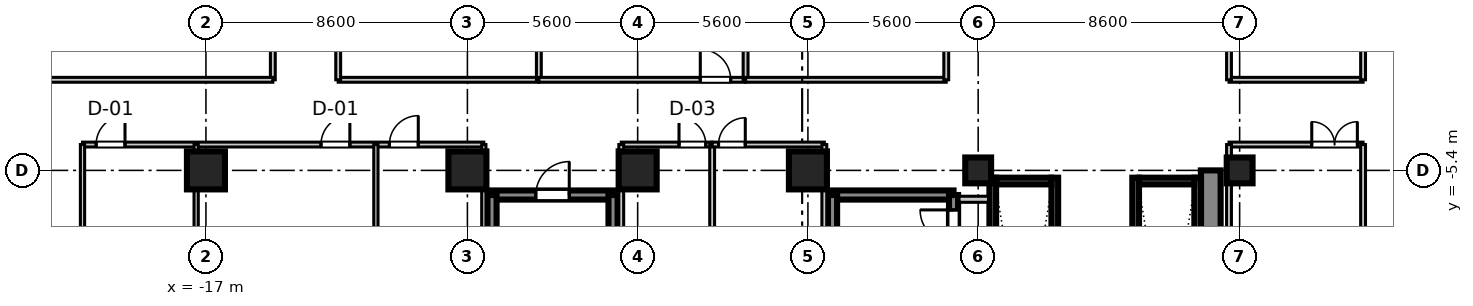
"""IFC4 building model, lengths in metres.
Left out: names, types, materials, properties, quantities, classifications, styles, units other than length and angle.
Written with IfcOpenShell. Run it as: python <this file> out.ifc"""

import sys

from ifc_helpers import new_model, si_unit, direction, frame, frame_2d, origin, origin_2d, place, context, subcontext, project, spatial, rectangle, extrude, source, transform, mapped, element, fill, save


model = new_model("IFC4")
c1 = context("Model", 3, precision=1e-05, world=origin(), true_north=direction((0.0, 1.0)))
c2 = subcontext(c1, "Body", "Model", "MODEL_VIEW")
j1 = project(units=[si_unit("LENGTHUNIT", "METRE"), si_unit("PLANEANGLEUNIT", "RADIAN")], contexts=[c1])
p1 = place(None, origin())
s1 = spatial("IfcSite", under=j1, at=p1, CompositionType="ELEMENT")
p2 = place(p1, origin())
s2 = spatial("IfcBuilding", under=s1, at=p2, CompositionType="ELEMENT")
p3 = place(p2, frame((0.0, 0.0, 88.3)))
s3 = spatial("IfcBuildingStorey", under=s2, at=p3, CompositionType="ELEMENT", Elevation=88.3)
m1 = source(origin(), c2, "Body", "SweptSolid", [
    extrude(rectangle(XDim=1.25, YDim=1.25, at=origin_2d()), origin(), (0.0, 0.0, 1.0), 3.605),
])
for number, where, z_axis, x_axis in (
    (1, (-17.0, -5.4, 0.0), (0.0, 0.0, 1.0), (1.0, 0.0, 0.0)),
    (2, (-8.4, -5.4, 0.0), (0.0, 0.0, 1.0), (1.0, 0.0, 0.0)),
    (3, (-2.8, -5.4, 0.0), (0.0, 0.0, 1.0), (1.0, 0.0, 0.0)),
    (4, (2.8, -5.4, 0.0), (0.0, 0.0, 1.0), (1.0, 0.0, 0.0)),
):
    element("IfcColumn", number, at=place(p3, frame(where, z_axis=z_axis, x_axis=x_axis)), inside=s3, PredefinedType="COLUMN", context=c2, shape_type="MappedRepresentation", body=[
        mapped(m1, transform((0.0, 0.0, 0.0), scale=1.0)),
    ])
m2 = source(origin(), c2, "Body", "SweptSolid", [
    extrude(rectangle(XDim=0.85, YDim=0.85, at=origin_2d()), origin(), (0.0, 0.0, 1.0), 3.605),
])
for number, where, z_axis, x_axis in (
    (5, (8.4, -5.4, 0.0), (0.0, 0.0, 1.0), (1.0, 0.0, 0.0)),
    (6, (17.0, -5.4, 0.0), (0.0, 0.0, 1.0), (1.0, 0.0, 0.0)),
):
    element("IfcColumn", number, at=place(p3, frame(where, z_axis=z_axis, x_axis=x_axis)), inside=s3, PredefinedType="PILASTER", context=c2, shape_type="MappedRepresentation", body=[
        mapped(m2, transform((0.0, 0.0, 0.0), scale=1.0)),
    ])
m3 = source(origin(), c2, "Body", "SweptSolid", [
    extrude(rectangle(XDim=11.6, YDim=0.65, at=frame_2d((5.8, 0.0))), origin(), (0.0, 0.0, 1.0), 3.38),
])
p4 = place(p3, frame((16.05, -17.0, 0.0), z_axis=(0.0, 0.0, 1.0), x_axis=(0.0, 1.0, 0.0)))
e7 = element("IfcWall", 7, at=p4, inside=s3, PredefinedType="SHEAR", context=c2, shape_type="MappedRepresentation", body=[
    mapped(m3, transform((0.0, 0.0, 0.0), scale=1.0)),
])
m4 = source(origin(), c2, "Body", "SweptSolid", [
    extrude(rectangle(XDim=3.98, YDim=0.3, at=frame_2d((1.99, 0.0))), origin(), (0.0, 0.0, 1.0), 3.38),
])
p5 = place(p3, frame((3.61, -6.21, 0.0), z_axis=(0.0, 0.0, 1.0), x_axis=(1.0, 0.0, 0.0)))
e8 = element("IfcWall", 8, at=p5, inside=s3, PredefinedType="SHEAR", context=c2, shape_type="MappedRepresentation", body=[
    mapped(m4, transform((0.0, 0.0, 0.0), scale=1.0)),
])
m5 = source(origin(), c2, "Body", "SweptSolid", [
    extrude(rectangle(XDim=9.38, YDim=0.3, at=frame_2d((4.69, 0.0))), origin(), (0.0, 0.0, 1.0), 3.38),
])
p6 = place(p3, frame((3.61, -15.59, 0.0), z_axis=(0.0, 0.0, 1.0), x_axis=(0.0, 1.0, 0.0)))
e9 = element("IfcWall", 9, at=p6, inside=s3, PredefinedType="SHEAR", context=c2, shape_type="MappedRepresentation", body=[
    mapped(m5, transform((0.0, 0.0, 0.0), scale=1.0)),
])
p7 = place(p3, frame((7.59, -15.59, 0.0), z_axis=(0.0, 0.0, 1.0), x_axis=(0.0, 1.0, 0.0)))
e10 = element("IfcWall", 10, at=p7, inside=s3, PredefinedType="SHEAR", context=c2, shape_type="MappedRepresentation", body=[
    mapped(m5, transform((0.0, 0.0, 0.0), scale=1.0)),
])
p8 = place(p7, frame((7.79, 0.0, 0.0)))
e11 = element("IfcOpeningElement", 11, at=p8, cuts=e10, PredefinedType="OPENING", context=c2, shape_type="SweptSolid", body=[
    extrude(rectangle(XDim=1.1, YDim=2.15, at=frame_2d((0.55, 1.075))), frame((0.0, 0.16, 0.0), z_axis=(0.0, -1.0, 0.0), x_axis=(1.0, 0.0, 0.0)), (0.0, 0.0, 1.0), 0.32),
])
p9 = place(p3, frame((-7.59, -6.21, 0.0), z_axis=(0.0, 0.0, 1.0), x_axis=(1.0, 0.0, 0.0)))
e12 = element("IfcWall", 12, at=p9, inside=s3, PredefinedType="SHEAR", context=c2, shape_type="MappedRepresentation", body=[
    mapped(m4, transform((0.0, 0.0, 0.0), scale=1.0)),
])
p10 = place(p9, frame((1.44, 0.0, 0.0)))
e13 = element("IfcOpeningElement", 13, at=p10, cuts=e12, PredefinedType="OPENING", context=c2, shape_type="SweptSolid", body=[
    extrude(rectangle(XDim=1.1, YDim=2.15, at=frame_2d((0.55, 1.075))), frame((0.0, 0.16, 0.0), z_axis=(0.0, -1.0, 0.0), x_axis=(1.0, 0.0, 0.0)), (0.0, 0.0, 1.0), 0.32),
])
for number, where, z_axis, x_axis in (
    (14, (-7.59, -15.59, 0.0), (0.0, 0.0, 1.0), (0.0, 1.0, 0.0)),
    (15, (-3.61, -15.59, 0.0), (0.0, 0.0, 1.0), (0.0, 1.0, 0.0)),
):
    element("IfcWall", number, at=place(p3, frame(where, z_axis=z_axis, x_axis=x_axis)), inside=s3, PredefinedType="SHEAR", context=c2, shape_type="MappedRepresentation", body=[
        mapped(m5, transform((0.0, 0.0, 0.0), scale=1.0)),
    ])
m6 = source(origin(), c2, "Body", "SweptSolid", [
    extrude(rectangle(XDim=2.36, YDim=0.22, at=frame_2d((1.18, 0.0))), origin(), (0.0, 0.0, 1.0), 3.38),
])
for number, where, z_axis, x_axis in (
    (16, (13.58, -8.0, 0.0), (0.0, 0.0, 1.0), (0.0, 1.0, 0.0)),
    (17, (15.62, -8.0, 0.0), (0.0, 0.0, 1.0), (0.0, 1.0, 0.0)),
):
    element("IfcWall", number, at=place(p3, frame(where, z_axis=z_axis, x_axis=x_axis)), inside=s3, PredefinedType="SHEAR", context=c2, shape_type="MappedRepresentation", body=[
        mapped(m6, transform((0.0, 0.0, 0.0), scale=1.0)),
    ])
m7 = source(origin(), c2, "Body", "SweptSolid", [
    extrude(rectangle(XDim=1.82, YDim=0.22, at=frame_2d((0.91, 0.0))), origin(), (0.0, 0.0, 1.0), 3.38),
])
p11 = place(p3, frame((13.69, -5.75, 0.0), z_axis=(0.0, 0.0, 1.0), x_axis=(1.0, 0.0, 0.0)))
e18 = element("IfcWall", 18, at=p11, inside=s3, PredefinedType="SHEAR", context=c2, shape_type="MappedRepresentation", body=[
    mapped(m7, transform((0.0, 0.0, 0.0), scale=1.0)),
])
for number, where, z_axis, x_axis in (
    (19, (8.88, -8.0, 0.0), (0.0, 0.0, 1.0), (0.0, 1.0, 0.0)),
    (20, (10.92, -8.0, 0.0), (0.0, 0.0, 1.0), (0.0, 1.0, 0.0)),
):
    element("IfcWall", number, at=place(p3, frame(where, z_axis=z_axis, x_axis=x_axis)), inside=s3, PredefinedType="SHEAR", context=c2, shape_type="MappedRepresentation", body=[
        mapped(m6, transform((0.0, 0.0, 0.0), scale=1.0)),
    ])
p12 = place(p3, frame((8.99, -5.75, 0.0), z_axis=(0.0, 0.0, 1.0), x_axis=(1.0, 0.0, 0.0)))
e21 = element("IfcWall", 21, at=p12, inside=s3, PredefinedType="SHEAR", context=c2, shape_type="MappedRepresentation", body=[
    mapped(m7, transform((0.0, 0.0, 0.0), scale=1.0)),
])
m8 = source(origin(), c2, "Body", "SweptSolid", [
    extrude(rectangle(XDim=0.97, YDim=0.2, at=frame_2d((0.485, 0.0))), origin(), (0.0, 0.0, 1.0), 2.72),
])
p13 = place(p3, frame((7.77, -6.35, 0.0), z_axis=(0.0, 0.0, 1.0), x_axis=(1.0, 0.0, 0.0)))
e22 = element("IfcWall", 22, at=p13, inside=s3, PredefinedType="PARTITIONING", context=c2, shape_type="MappedRepresentation", body=[
    mapped(m8, transform((0.0, 0.0, 0.0), scale=1.0)),
])
m9 = source(origin(), c2, "Body", "SweptSolid", [
    extrude(rectangle(XDim=4.41, YDim=0.16, at=frame_2d((2.205, 0.0))), origin(), (0.0, 0.0, 1.0), 2.72),
])
p14 = place(p3, frame((16.65, -4.55, 0.0), z_axis=(0.0, 0.0, 1.0), x_axis=(1.0, 0.0, 0.0)))
e23 = element("IfcWall", 23, at=p14, inside=s3, PredefinedType="PARTITIONING", context=c2, shape_type="MappedRepresentation", body=[
    mapped(m9, transform((0.0, 0.0, 0.0), scale=1.0)),
])
p15 = place(p14, frame((2.722, 0.0, 0.0)))
e24 = element("IfcOpeningElement", 24, at=p15, cuts=e23, PredefinedType="OPENING", context=c2, shape_type="SweptSolid", body=[
    extrude(rectangle(XDim=1.5, YDim=2.15, at=frame_2d((0.75, 1.075))), frame((0.0, 0.09, 0.0), z_axis=(0.0, -1.0, 0.0), x_axis=(1.0, 0.0, 0.0)), (0.0, 0.0, 1.0), 0.18),
])
m10 = source(origin(), c2, "Body", "SweptSolid", [
    extrude(rectangle(XDim=19.25, YDim=0.16, at=frame_2d((9.625, 0.0))), origin(), (0.0, 0.0, 1.0), 2.72),
])
p16 = place(p3, frame((16.65, -23.8, 0.0), z_axis=(0.0, 0.0, 1.0), x_axis=(0.0, 1.0, 0.0)))
e25 = element("IfcWall", 25, at=p16, inside=s3, PredefinedType="PARTITIONING", context=c2, shape_type="MappedRepresentation", body=[
    mapped(m10, transform((0.0, 0.0, 0.0), scale=1.0)),
])
m11 = source(origin(), c2, "Body", "SweptSolid", [
    extrude(rectangle(XDim=17.83, YDim=0.16, at=frame_2d((8.915, 0.0))), origin(), (0.0, 0.0, 1.0), 2.72),
])
p17 = place(p3, frame((21.06, -22.38, 0.0), z_axis=(0.0, 0.0, 1.0), x_axis=(0.0, 1.0, 0.0)))
e26 = element("IfcWall", 26, at=p17, inside=s3, PredefinedType="PARTITIONING", context=c2, shape_type="MappedRepresentation", body=[
    mapped(m11, transform((0.0, 0.0, 0.0), scale=1.0)),
])
m12 = source(origin(), c2, "Body", "SweptSolid", [
    extrude(rectangle(XDim=13.2, YDim=0.16, at=frame_2d((6.6, 0.0))), origin(), (0.0, 0.0, 1.0), 2.72),
])
p18 = place(p3, frame((-21.06, -4.55, 0.0), z_axis=(0.0, 0.0, 1.0), x_axis=(1.0, 0.0, 0.0)))
e27 = element("IfcWall", 27, at=p18, inside=s3, PredefinedType="PARTITIONING", context=c2, shape_type="MappedRepresentation", body=[
    mapped(m12, transform((0.0, 0.0, 0.0), scale=1.0)),
])
p19 = place(p18, frame((0.448, 0.0, 0.0)))
e28 = element("IfcOpeningElement", 28, at=p19, cuts=e27, PredefinedType="OPENING", context=c2, shape_type="SweptSolid", body=[
    extrude(rectangle(XDim=0.95, YDim=2.1, at=frame_2d((0.475, 1.05))), frame((0.0, 0.09, 0.0), z_axis=(0.0, -1.0, 0.0), x_axis=(1.0, 0.0, 0.0)), (0.0, 0.0, 1.0), 0.18),
])
p20 = place(p18, frame((7.844, 0.0, 0.0)))
e29 = element("IfcOpeningElement", 29, at=p20, cuts=e27, PredefinedType="OPENING", context=c2, shape_type="SweptSolid", body=[
    extrude(rectangle(XDim=0.95, YDim=2.1, at=frame_2d((0.475, 1.05))), frame((0.0, 0.09, 0.0), z_axis=(0.0, -1.0, 0.0), x_axis=(1.0, 0.0, 0.0)), (0.0, 0.0, 1.0), 0.18),
])
p21 = place(p18, frame((10.094, 0.0, 0.0)))
e30 = element("IfcOpeningElement", 30, at=p21, cuts=e27, PredefinedType="OPENING", context=c2, shape_type="SweptSolid", body=[
    extrude(rectangle(XDim=0.95, YDim=2.1, at=frame_2d((0.475, 1.05))), frame((0.0, 0.09, 0.0), z_axis=(0.0, -1.0, 0.0), x_axis=(1.0, 0.0, 0.0)), (0.0, 0.0, 1.0), 0.18),
])
m13 = source(origin(), c2, "Body", "SweptSolid", [
    extrude(rectangle(XDim=17.83, YDim=0.14, at=frame_2d((8.915, 0.0))), origin(), (0.0, 0.0, 1.0), 2.72),
])
p22 = place(p3, frame((-21.06, -22.38, 0.0), z_axis=(0.0, 0.0, 1.0), x_axis=(0.0, 1.0, 0.0)))
e31 = element("IfcWall", 31, at=p22, inside=s3, PredefinedType="PARTITIONING", context=c2, shape_type="MappedRepresentation", body=[
    mapped(m13, transform((0.0, 0.0, 0.0), scale=1.0)),
])
m14 = source(origin(), c2, "Body", "SweptSolid", [
    extrude(rectangle(XDim=19.25, YDim=0.14, at=frame_2d((9.625, 0.0))), origin(), (0.0, 0.0, 1.0), 2.72),
])
for number, where, z_axis, x_axis in (
    (32, (-7.86, -23.8, 0.0), (0.0, 0.0, 1.0), (0.0, 1.0, 0.0)),
    (33, (-17.322, -23.8, 0.0), (0.0, 0.0, 1.0), (0.0, 1.0, 0.0)),
    (34, (-11.41, -23.8, 0.0), (0.0, 0.0, 1.0), (0.0, 1.0, 0.0)),
):
    element("IfcWall", number, at=place(p3, frame(where, z_axis=z_axis, x_axis=x_axis)), inside=s3, PredefinedType="PARTITIONING", context=c2, shape_type="MappedRepresentation", body=[
        mapped(m14, transform((0.0, 0.0, 0.0), scale=1.0)),
    ])
m15 = source(origin(), c2, "Body", "SweptSolid", [
    extrude(rectangle(XDim=2.99, YDim=0.16, at=frame_2d((1.495, 0.0))), origin(), (0.0, 0.0, 1.0), 2.72),
])
p23 = place(p3, frame((-3.34, -4.55, 0.0), z_axis=(0.0, 0.0, 1.0), x_axis=(1.0, 0.0, 0.0)))
e35 = element("IfcWall", 35, at=p23, inside=s3, PredefinedType="PARTITIONING", context=c2, shape_type="MappedRepresentation", body=[
    mapped(m15, transform((0.0, 0.0, 0.0), scale=1.0)),
])
p24 = place(p23, frame((1.9, 0.0, 0.0)))
e36 = element("IfcOpeningElement", 36, at=p24, cuts=e35, PredefinedType="OPENING", context=c2, shape_type="SweptSolid", body=[
    extrude(rectangle(XDim=0.88, YDim=2.1, at=frame_2d((0.44, 1.05))), frame((0.0, 0.09, 0.0), z_axis=(0.0, -1.0, 0.0), x_axis=(1.0, 0.0, 0.0)), (0.0, 0.0, 1.0), 0.18),
])
for number, where, z_axis, x_axis in (
    (37, (-3.34, -23.8, 0.0), (0.0, 0.0, 1.0), (0.0, 1.0, 0.0)),
    (38, (-0.35, -23.8, 0.0), (0.0, 0.0, 1.0), (0.0, 1.0, 0.0)),
):
    element("IfcWall", number, at=place(p3, frame(where, z_axis=z_axis, x_axis=x_axis)), inside=s3, PredefinedType="PARTITIONING", context=c2, shape_type="MappedRepresentation", body=[
        mapped(m10, transform((0.0, 0.0, 0.0), scale=1.0)),
    ])
m16 = source(origin(), c2, "Body", "SweptSolid", [
    extrude(rectangle(XDim=3.69, YDim=0.16, at=frame_2d((1.845, 0.0))), origin(), (0.0, 0.0, 1.0), 2.72),
])
p25 = place(p3, frame((-0.35, -4.55, 0.0), z_axis=(0.0, 0.0, 1.0), x_axis=(1.0, 0.0, 0.0)))
e39 = element("IfcWall", 39, at=p25, inside=s3, PredefinedType="PARTITIONING", context=c2, shape_type="MappedRepresentation", body=[
    mapped(m16, transform((0.0, 0.0, 0.0), scale=1.0)),
])
p26 = place(p25, frame((0.21, 0.0, 0.0)))
e40 = element("IfcOpeningElement", 40, at=p26, cuts=e39, PredefinedType="OPENING", context=c2, shape_type="SweptSolid", body=[
    extrude(rectangle(XDim=0.88, YDim=2.1, at=frame_2d((0.44, 1.05))), frame((0.0, 0.09, 0.0), z_axis=(0.0, -1.0, 0.0), x_axis=(1.0, 0.0, 0.0)), (0.0, 0.0, 1.0), 0.18),
])
p27 = place(p3, frame((3.34, -23.8, 0.0), z_axis=(0.0, 0.0, 1.0), x_axis=(0.0, 1.0, 0.0)))
e41 = element("IfcWall", 41, at=p27, inside=s3, PredefinedType="PARTITIONING", context=c2, shape_type="MappedRepresentation", body=[
    mapped(m10, transform((0.0, 0.0, 0.0), scale=1.0)),
])
m17 = source(origin(), c2, "Body", "SweptSolid", [
    extrude(rectangle(XDim=4.84, YDim=0.16, at=frame_2d((2.42, 0.0))), origin(), (0.0, 0.0, 1.0), 2.72),
])
p28 = place(p3, frame((-14.8, -2.42, 0.0), z_axis=(0.0, 0.0, 1.0), x_axis=(0.0, 1.0, 0.0)))
e42 = element("IfcWall", 42, at=p28, inside=s3, PredefinedType="PARTITIONING", context=c2, shape_type="MappedRepresentation", body=[
    mapped(m17, transform((0.0, 0.0, 0.0), scale=1.0)),
])
m18 = source(origin(), c2, "Body", "SweptSolid", [
    extrude(rectangle(XDim=9.0, YDim=0.16, at=frame_2d((4.5, 0.0))), origin(), (0.0, 0.0, 1.0), 2.72),
])
p29 = place(p3, frame((-23.8, -2.42, 0.0), z_axis=(0.0, 0.0, 1.0), x_axis=(1.0, 0.0, 0.0)))
e43 = element("IfcWall", 43, at=p29, inside=s3, PredefinedType="PARTITIONING", context=c2, shape_type="MappedRepresentation", body=[
    mapped(m18, transform((0.0, 0.0, 0.0), scale=1.0)),
])
m19 = source(origin(), c2, "Body", "SweptSolid", [
    extrude(rectangle(XDim=6.6, YDim=0.16, at=frame_2d((3.3, 0.0))), origin(), (0.0, 0.0, 1.0), 2.72),
])
p30 = place(p3, frame((-12.65, -2.42, 0.0), z_axis=(0.0, 0.0, 1.0), x_axis=(1.0, 0.0, 0.0)))
e44 = element("IfcWall", 44, at=p30, inside=s3, PredefinedType="PARTITIONING", context=c2, shape_type="MappedRepresentation", body=[
    mapped(m19, transform((0.0, 0.0, 0.0), scale=1.0)),
])
for number, where, z_axis, x_axis in (
    (45, (-12.65, -2.42, 0.0), (0.0, 0.0, 1.0), (0.0, 1.0, 0.0)),
    (46, (-6.05, -2.42, 0.0), (0.0, 0.0, 1.0), (0.0, 1.0, 0.0)),
):
    element("IfcWall", number, at=place(p3, frame(where, z_axis=z_axis, x_axis=x_axis)), inside=s3, PredefinedType="PARTITIONING", context=c2, shape_type="MappedRepresentation", body=[
        mapped(m17, transform((0.0, 0.0, 0.0), scale=1.0)),
    ])
m20 = source(origin(), c2, "Body", "SweptSolid", [
    extrude(rectangle(XDim=6.8, YDim=0.16, at=frame_2d((3.4, 0.0))), origin(), (0.0, 0.0, 1.0), 2.72),
])
p31 = place(p3, frame((-6.05, -2.42, 0.0), z_axis=(0.0, 0.0, 1.0), x_axis=(1.0, 0.0, 0.0)))
e47 = element("IfcWall", 47, at=p31, inside=s3, PredefinedType="PARTITIONING", context=c2, shape_type="MappedRepresentation", body=[
    mapped(m20, transform((0.0, 0.0, 0.0), scale=1.0)),
])
p32 = place(p31, frame((5.31, 0.0, 0.0)))
e48 = element("IfcOpeningElement", 48, at=p32, cuts=e47, PredefinedType="OPENING", context=c2, shape_type="SweptSolid", body=[
    extrude(rectangle(XDim=1.0, YDim=2.1, at=frame_2d((0.5, 1.05))), frame((0.0, 0.09, 0.0), z_axis=(0.0, -1.0, 0.0), x_axis=(1.0, 0.0, 0.0)), (0.0, 0.0, 1.0), 0.18),
])
p33 = place(p3, frame((0.75, -2.42, 0.0), z_axis=(0.0, 0.0, 1.0), x_axis=(0.0, 1.0, 0.0)))
e49 = element("IfcWall", 49, at=p33, inside=s3, PredefinedType="PARTITIONING", context=c2, shape_type="MappedRepresentation", body=[
    mapped(m17, transform((0.0, 0.0, 0.0), scale=1.0)),
])
m21 = source(origin(), c2, "Body", "SweptSolid", [
    extrude(rectangle(XDim=6.6, YDim=0.16, at=frame_2d((3.3, 0.0))), origin(), (0.0, 0.0, 1.0), 2.72),
])
p34 = place(p3, frame((0.75, -2.42, 0.0), z_axis=(0.0, 0.0, 1.0), x_axis=(1.0, 0.0, 0.0)))
e50 = element("IfcWall", 50, at=p34, inside=s3, PredefinedType="PARTITIONING", context=c2, shape_type="MappedRepresentation", body=[
    mapped(m21, transform((0.0, 0.0, 0.0), scale=1.0)),
])
p35 = place(p3, frame((7.35, -2.42, 0.0), z_axis=(0.0, 0.0, 1.0), x_axis=(0.0, 1.0, 0.0)))
e51 = element("IfcWall", 51, at=p35, inside=s3, PredefinedType="PARTITIONING", context=c2, shape_type="MappedRepresentation", body=[
    mapped(m17, transform((0.0, 0.0, 0.0), scale=1.0)),
])
p36 = place(p3, frame((16.65, -2.42, 0.0), z_axis=(0.0, 0.0, 1.0), x_axis=(1.0, 0.0, 0.0)))
e52 = element("IfcWall", 52, at=p36, inside=s3, PredefinedType="PARTITIONING", context=c2, shape_type="MappedRepresentation", body=[
    mapped(m9, transform((0.0, 0.0, 0.0), scale=1.0)),
])
for number, where, z_axis, x_axis in (
    (53, (16.65, -2.42, 0.0), (0.0, 0.0, 1.0), (0.0, 1.0, 0.0)),
    (54, (21.06, -2.42, 0.0), (0.0, 0.0, 1.0), (0.0, 1.0, 0.0)),
):
    element("IfcWall", number, at=place(p3, frame(where, z_axis=z_axis, x_axis=x_axis)), inside=s3, PredefinedType="PARTITIONING", context=c2, shape_type="MappedRepresentation", body=[
        mapped(m17, transform((0.0, 0.0, 0.0), scale=1.0)),
    ])
m22 = source(origin(), c2, "Body", "SweptSolid", [
    extrude(rectangle(XDim=1.1, YDim=2.15, at=frame_2d((0.55, 1.075))), frame((0.0, 0.025, 0.0), z_axis=(0.0, -1.0, 0.0), x_axis=(1.0, 0.0, 0.0)), (0.0, 0.0, 1.0), 0.05),
])
p37 = place(p8, origin())
e55 = element("IfcDoor", 55, at=p37, inside=s3, OperationType="SINGLE_SWING_RIGHT", PredefinedType="DOOR", context=c2, shape_type="MappedRepresentation", body=[
    mapped(m22, transform((0.0, 0.0, 0.0), scale=1.0)),
])
fill(e11, e55)
p38 = place(p10, frame((1.1, 0.0, 0.0), z_axis=(0.0, 0.0, 1.0), x_axis=(-1.0, 0.0, 0.0)))
e56 = element("IfcDoor", 56, at=p38, inside=s3, OperationType="SINGLE_SWING_RIGHT", PredefinedType="DOOR", context=c2, shape_type="MappedRepresentation", body=[
    mapped(m22, transform((0.0, 0.0, 0.0), scale=1.0)),
])
fill(e13, e56)
m23 = source(origin(), c2, "Body", "SweptSolid", [
    extrude(rectangle(XDim=1.5, YDim=2.15, at=frame_2d((0.75, 1.075))), frame((0.0, 0.025, 0.0), z_axis=(0.0, -1.0, 0.0), x_axis=(1.0, 0.0, 0.0)), (0.0, 0.0, 1.0), 0.05),
])
p39 = place(p15, frame((1.5, 0.0, 0.0), z_axis=(0.0, 0.0, 1.0), x_axis=(-1.0, 0.0, 0.0)))
e57 = element("IfcDoor", 57, at=p39, inside=s3, OperationType="DOUBLE_DOOR_SINGLE_SWING", PredefinedType="DOOR", context=c2, shape_type="MappedRepresentation", body=[
    mapped(m23, transform((0.0, 0.0, 0.0), scale=1.0)),
])
fill(e24, e57)
m24 = source(origin(), c2, "Body", "SweptSolid", [
    extrude(rectangle(XDim=0.95, YDim=2.1, at=frame_2d((0.475, 1.05))), frame((0.0, 0.025, 0.0), z_axis=(0.0, -1.0, 0.0), x_axis=(1.0, 0.0, 0.0)), (0.0, 0.0, 1.0), 0.05),
])
p40 = place(p19, frame((0.95, 0.0, 0.0), z_axis=(0.0, 0.0, 1.0), x_axis=(-1.0, 0.0, 0.0)))
e58 = element("IfcDoor", 58, at=p40, inside=s3, OperationType="SINGLE_SWING_RIGHT", PredefinedType="DOOR", context=c2, shape_type="MappedRepresentation", body=[
    mapped(m24, transform((0.0, 0.0, 0.0), scale=1.0)),
])
fill(e28, e58)
p41 = place(p20, frame((0.95, 0.0, 0.0), z_axis=(0.0, 0.0, 1.0), x_axis=(-1.0, 0.0, 0.0)))
e59 = element("IfcDoor", 59, at=p41, inside=s3, OperationType="SINGLE_SWING_RIGHT", PredefinedType="DOOR", context=c2, shape_type="MappedRepresentation", body=[
    mapped(m24, transform((0.0, 0.0, 0.0), scale=1.0)),
])
fill(e29, e59)
p42 = place(p21, frame((0.95, 0.0, 0.0), z_axis=(0.0, 0.0, 1.0), x_axis=(-1.0, 0.0, 0.0)))
e60 = element("IfcDoor", 60, at=p42, inside=s3, OperationType="SINGLE_SWING_RIGHT", PredefinedType="DOOR", context=c2, shape_type="MappedRepresentation", body=[
    mapped(m24, transform((0.0, 0.0, 0.0), scale=1.0)),
])
fill(e30, e60)
m25 = source(origin(), c2, "Body", "SweptSolid", [
    extrude(rectangle(XDim=0.88, YDim=2.1, at=frame_2d((0.44, 1.05))), frame((0.0, 0.025, 0.0), z_axis=(0.0, -1.0, 0.0), x_axis=(1.0, 0.0, 0.0)), (0.0, 0.0, 1.0), 0.05),
])
p43 = place(p24, frame((0.88, 0.0, 0.0), z_axis=(0.0, 0.0, 1.0), x_axis=(-1.0, 0.0, 0.0)))
e61 = element("IfcDoor", 61, at=p43, inside=s3, OperationType="SINGLE_SWING_LEFT", PredefinedType="DOOR", context=c2, shape_type="MappedRepresentation", body=[
    mapped(m25, transform((0.0, 0.0, 0.0), scale=1.0)),
])
fill(e36, e61)
p44 = place(p26, frame((0.88, 0.0, 0.0), z_axis=(0.0, 0.0, 1.0), x_axis=(-1.0, 0.0, 0.0)))
e62 = element("IfcDoor", 62, at=p44, inside=s3, OperationType="SINGLE_SWING_RIGHT", PredefinedType="DOOR", context=c2, shape_type="MappedRepresentation", body=[
    mapped(m25, transform((0.0, 0.0, 0.0), scale=1.0)),
])
fill(e40, e62)
m26 = source(origin(), c2, "Body", "SweptSolid", [
    extrude(rectangle(XDim=1.0, YDim=2.1, at=frame_2d((0.5, 1.05))), frame((0.0, 0.025, 0.0), z_axis=(0.0, -1.0, 0.0), x_axis=(1.0, 0.0, 0.0)), (0.0, 0.0, 1.0), 0.05),
])
p45 = place(p32, origin())
e63 = element("IfcDoor", 63, at=p45, inside=s3, OperationType="SINGLE_SWING_LEFT", PredefinedType="DOOR", context=c2, shape_type="MappedRepresentation", body=[
    mapped(m26, transform((0.0, 0.0, 0.0), scale=1.0)),
])
fill(e48, e63)
save(model, sys.argv[1])
